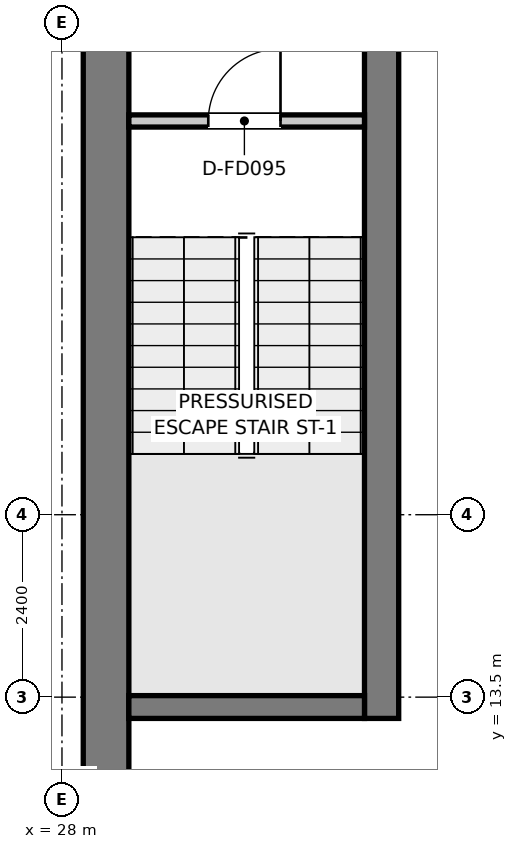
"""IFC4 building model, lengths in metres.
Left out: names, types, materials, properties, quantities, classifications, styles, units other than length and angle.
Written with IfcOpenShell. Run it as: python <this file> out.ifc"""

import sys

from ifc_helpers import new_model, si_unit, direction, frame, frame_2d, origin, place, context, subcontext, project, spatial, rectangle, extrude, element, fill, save


model = new_model("IFC4")
c1 = context("Model", 3, precision=1e-05, world=origin(), true_north=direction((0.0, 1.0)))
c2 = subcontext(c1, "Body", "Model", "MODEL_VIEW")
j1 = project(units=[si_unit("LENGTHUNIT", "METRE"), si_unit("PLANEANGLEUNIT", "RADIAN")], contexts=[c1])
p1 = place(None, origin())
s1 = spatial("IfcSite", under=j1, at=p1, CompositionType="ELEMENT")
p2 = place(p1, origin())
s2 = spatial("IfcBuilding", under=s1, at=p2, CompositionType="ELEMENT")
p3 = place(p2, frame((0.0, 0.0, 381.85)))
s3 = spatial("IfcBuildingStorey", under=s2, at=p3, CompositionType="ELEMENT", Elevation=381.85)
p4 = place(p3, frame((28.58, 11.1, 0.0), z_axis=(0.0, 0.0, 1.0), x_axis=(0.0, 1.0, 0.0)))
e1 = element("IfcWall", 1, at=p4, inside=s3, PredefinedType="SHEAR", context=c2, shape_type="SweptSolid", body=[
    extrude(rectangle(XDim=15.1, YDim=0.6, at=frame_2d((7.55, 0.0))), origin(), (0.0, 0.0, 1.0), 3.6),
])
p5 = place(p3, frame((32.205, 13.22, 0.0), z_axis=(0.0, 0.0, 1.0), x_axis=(0.0, 1.0, 0.0)))
e2 = element("IfcWall", 2, at=p5, inside=s3, PredefinedType="SHEAR", context=c2, shape_type="SweptSolid", body=[
    extrude(rectangle(XDim=12.98, YDim=0.45, at=frame_2d((6.49, 0.0))), origin(), (0.0, 0.0, 1.0), 3.6),
])
p6 = place(p5, frame((10.58, 0.0, 0.0)))
e3 = element("IfcOpeningElement", 3, at=p6, cuts=e2, PredefinedType="OPENING", context=c2, shape_type="SweptSolid", body=[
    extrude(rectangle(XDim=1.1, YDim=2.15, at=frame_2d((0.55, 1.075))), frame((0.0, 0.235, 0.0), z_axis=(0.0, -1.0, 0.0), x_axis=(1.0, 0.0, 0.0)), (0.0, 0.0, 1.0), 0.47),
])
p7 = place(p3, frame((28.88, 13.37, 0.0), z_axis=(0.0, 0.0, 1.0), x_axis=(1.0, 0.0, 0.0)))
e4 = element("IfcWall", 4, at=p7, inside=s3, PredefinedType="SHEAR", context=c2, shape_type="SweptSolid", body=[
    extrude(rectangle(XDim=3.1, YDim=0.3, at=frame_2d((1.55, 0.0))), origin(), (0.0, 0.0, 1.0), 3.6),
])
p8 = place(p3, frame((28.88, 21.08, 0.0), z_axis=(0.0, 0.0, 1.0), x_axis=(1.0, 0.0, 0.0)))
e5 = element("IfcWall", 5, at=p8, inside=s3, PredefinedType="PARTITIONING", context=c2, shape_type="SweptSolid", body=[
    extrude(rectangle(XDim=3.1, YDim=0.16, at=frame_2d((1.55, 0.0))), origin(), (0.0, 0.0, 1.0), 3.3),
])
p9 = place(p8, frame((1.045, 0.0, 0.0)))
e6 = element("IfcOpeningElement", 6, at=p9, cuts=e5, PredefinedType="OPENING", context=c2, shape_type="SweptSolid", body=[
    extrude(rectangle(XDim=0.95, YDim=2.1, at=frame_2d((0.475, 1.05))), frame((0.0, 0.09, 0.0), z_axis=(0.0, -1.0, 0.0), x_axis=(1.0, 0.0, 0.0)), (0.0, 0.0, 1.0), 0.18),
])
p10 = place(p9, origin())
e7 = element("IfcDoor", 7, at=p10, inside=s3, OperationType="SINGLE_SWING_RIGHT", PredefinedType="DOOR", context=c2, shape_type="SweptSolid", body=[
    extrude(rectangle(XDim=0.95, YDim=2.1, at=frame_2d((0.475, 1.05))), frame((0.0, 0.025, 0.0), z_axis=(0.0, -1.0, 0.0), x_axis=(1.0, 0.0, 0.0)), (0.0, 0.0, 1.0), 0.05),
])
fill(e6, e7)
save(model, sys.argv[1])
